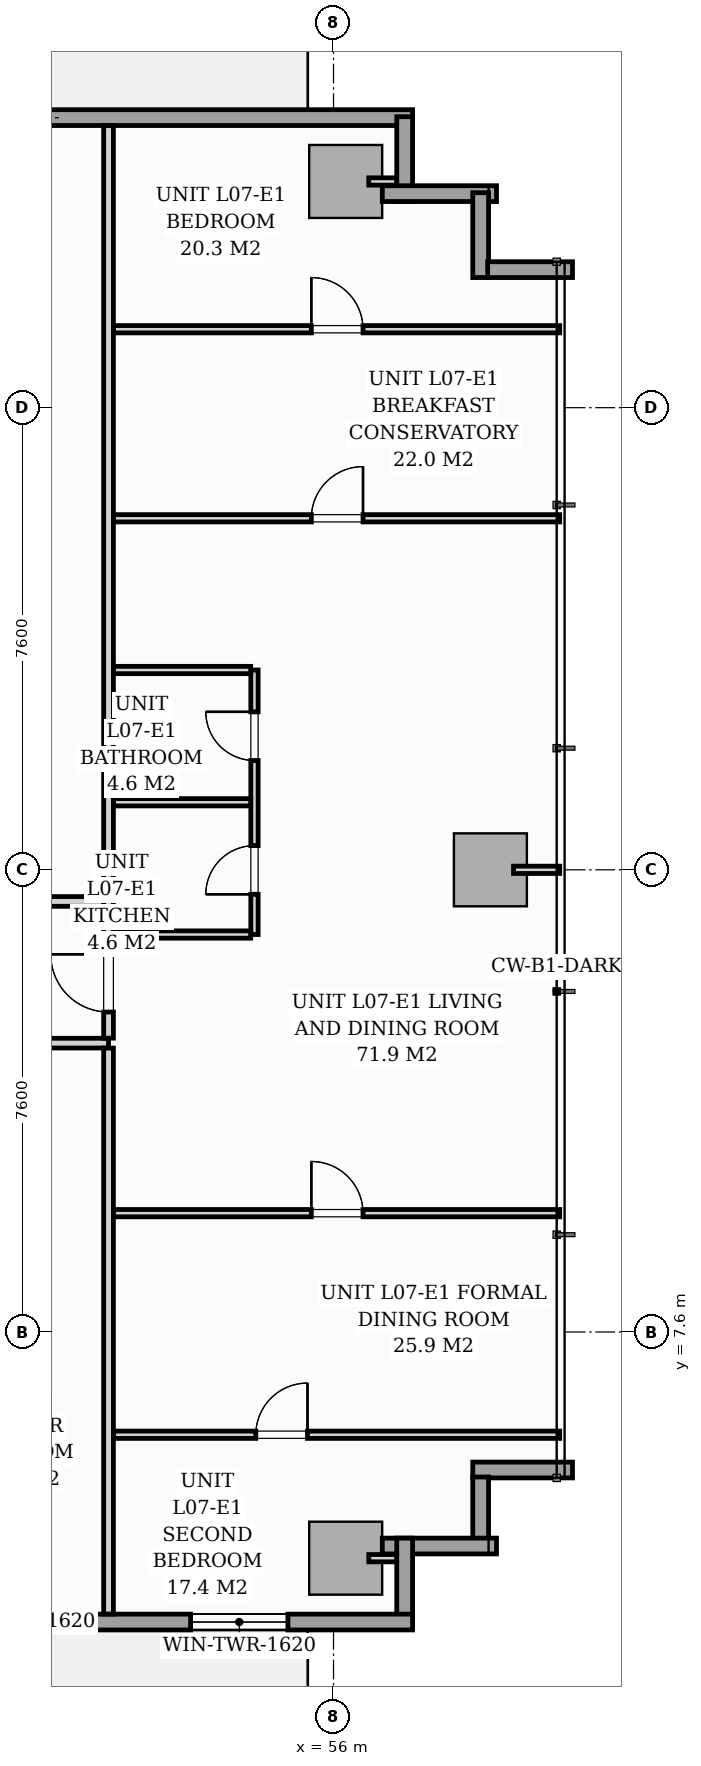
"""IFC4 building model, lengths in metres.
Left out: names, types, materials, properties, quantities, classifications, styles, units other than length and angle.
Written with IfcOpenShell. Run it as: python <this file> out.ifc"""

import sys

from ifc_helpers import new_model, si_unit, direction, frame, frame_2d, origin, origin_2d, place, context, subcontext, project, spatial, rectangle, extrude, source, transform, mapped, element, fill, save


model = new_model("IFC4")
c1 = context("Model", 3, precision=1e-05, world=origin(), true_north=direction((0.0, 1.0)))
c2 = subcontext(c1, "Body", "Model", "MODEL_VIEW")
j1 = project(units=[si_unit("LENGTHUNIT", "METRE"), si_unit("PLANEANGLEUNIT", "RADIAN")], contexts=[c1])
p1 = place(None, origin())
s1 = spatial("IfcSite", under=j1, at=p1, CompositionType="ELEMENT")
p2 = place(p1, origin())
s2 = spatial("IfcBuilding", under=s1, at=p2, CompositionType="ELEMENT")
p3 = place(p2, frame((0.0, 0.0, 29.4)))
s3 = spatial("IfcBuildingStorey", under=s2, at=p3, CompositionType="ELEMENT", Elevation=29.4)
m1 = source(origin(), c2, "Body", "SweptSolid", [
    extrude(rectangle(XDim=1.2, YDim=1.2, at=origin_2d()), origin(), (0.0, 0.0, 1.0), 3.196),
])
for number, where, z_axis, x_axis in (
    (1, (56.2, 3.88, 0.002), (0.0, 0.0, 1.0), (1.0, 0.0, 0.0)),
    (2, (56.2, 26.52, 0.002), (0.0, 0.0, 1.0), (1.0, 0.0, 0.0)),
    (3, (58.58, 15.2, 0.002), (0.0, 0.0, 1.0), (1.0, 0.0, 0.0)),
):
    element("IfcColumn", number, at=place(p3, frame(where, z_axis=z_axis, x_axis=x_axis)), inside=s3, PredefinedType="COLUMN", context=c2, shape_type="MappedRepresentation", body=[
        mapped(m1, transform((0.0, 0.0, 0.0), scale=1.0)),
    ])
p4 = place(p3, frame((40.15, 27.57, 0.0), z_axis=(0.0, 0.0, 1.0), x_axis=(1.0, 0.0, 0.0)))
e4 = element("IfcWall", 4, at=p4, inside=s3, PredefinedType="STANDARD", context=c2, shape_type="SweptSolid", body=[
    extrude(rectangle(XDim=17.15, YDim=0.26, at=frame_2d((8.575, 0.0))), origin(), (0.0, 0.0, 1.0), 2.94),
])
p5 = place(p4, frame((8.72, 0.0, 0.0)))
e5 = element("IfcOpeningElement", 5, at=p5, cuts=e4, PredefinedType="OPENING", context=c2, shape_type="SweptSolid", body=[
    extrude(rectangle(XDim=1.8, YDim=2.06, at=frame_2d((0.9, 1.03))), frame((0.0, 0.14, 0.0), z_axis=(0.0, -1.0, 0.0), x_axis=(1.0, 0.0, 0.0)), (0.0, 0.0, 1.0), 0.28),
])
p6 = place(p4, frame((0.7, 0.0, 0.65)))
e6 = element("IfcOpeningElement", 6, at=p6, cuts=e4, PredefinedType="OPENING", context=c2, shape_type="SweptSolid", body=[
    extrude(rectangle(XDim=1.6, YDim=1.5, at=frame_2d((0.8, 0.75))), frame((0.0, 0.14, 0.0), z_axis=(0.0, -1.0, 0.0), x_axis=(1.0, 0.0, 0.0)), (0.0, 0.0, 1.0), 0.28),
])
p7 = place(p3, frame((57.17, 27.585, 0.0), z_axis=(0.0, 0.0, 1.0), x_axis=(0.0, -1.0, 0.0)))
e7 = element("IfcWall", 7, at=p7, inside=s3, PredefinedType="STANDARD", context=c2, shape_type="SweptSolid", body=[
    extrude(rectangle(XDim=1.395, YDim=0.26, at=frame_2d((0.698, 0.0))), origin(), (0.0, 0.0, 1.0), 2.94),
])
p8 = place(p3, frame((56.802, 26.32, 0.0), z_axis=(0.0, 0.0, 1.0), x_axis=(1.0, 0.0, 0.0)))
e8 = element("IfcWall", 8, at=p8, inside=s3, PredefinedType="STANDARD", context=c2, shape_type="SweptSolid", body=[
    extrude(rectangle(XDim=1.878, YDim=0.26, at=frame_2d((0.939, 0.0))), origin(), (0.0, 0.0, 1.0), 2.94),
])
for number, where, z_axis, x_axis in (
    (9, (58.42, 26.335, 0.0), (0.0, 0.0, 1.0), (0.0, -1.0, 0.0)),
    (10, (58.535, 25.07, 0.0), (0.0, 0.0, 1.0), (1.0, 0.0, 0.0)),
):
    element("IfcWall", number, at=place(p3, frame(where, z_axis=z_axis, x_axis=x_axis)), inside=s3, PredefinedType="STANDARD", context=c2, shape_type="SweptSolid", body=[
        extrude(rectangle(XDim=1.395, YDim=0.26, at=frame_2d((0.698, 0.0))), origin(), (0.0, 0.0, 1.0), 2.94),
    ])
p9 = place(p3, frame((59.93, 5.33, 0.0), z_axis=(0.0, 0.0, 1.0), x_axis=(-1.0, 0.0, 0.0)))
e11 = element("IfcWall", 11, at=p9, inside=s3, PredefinedType="STANDARD", context=c2, shape_type="SweptSolid", body=[
    extrude(rectangle(XDim=1.64, YDim=0.26, at=frame_2d((0.82, 0.0))), origin(), (0.0, 0.0, 1.0), 2.94),
])
p10 = place(p3, frame((58.42, 5.215, 0.0), z_axis=(0.0, 0.0, 1.0), x_axis=(0.0, -1.0, 0.0)))
e12 = element("IfcWall", 12, at=p10, inside=s3, PredefinedType="STANDARD", context=c2, shape_type="SweptSolid", body=[
    extrude(rectangle(XDim=1.15, YDim=0.26, at=frame_2d((0.575, 0.0))), origin(), (0.0, 0.0, 1.0), 2.94),
])
p11 = place(p3, frame((58.68, 4.08, 0.0), z_axis=(0.0, 0.0, 1.0), x_axis=(-1.0, 0.0, 0.0)))
e13 = element("IfcWall", 13, at=p11, inside=s3, PredefinedType="STANDARD", context=c2, shape_type="SweptSolid", body=[
    extrude(rectangle(XDim=1.878, YDim=0.26, at=frame_2d((0.939, 0.0))), origin(), (0.0, 0.0, 1.0), 2.94),
])
p12 = place(p3, frame((57.17, 4.21, 0.0), z_axis=(0.0, 0.0, 1.0), x_axis=(0.0, -1.0, 0.0)))
e14 = element("IfcWall", 14, at=p12, inside=s3, PredefinedType="STANDARD", context=c2, shape_type="SweptSolid", body=[
    extrude(rectangle(XDim=1.395, YDim=0.26, at=frame_2d((0.698, 0.0))), origin(), (0.0, 0.0, 1.0), 2.94),
])
p13 = place(p3, frame((57.3, 2.83, 0.0), z_axis=(0.0, 0.0, 1.0), x_axis=(-1.0, 0.0, 0.0)))
e15 = element("IfcWall", 15, at=p13, inside=s3, PredefinedType="STANDARD", context=c2, shape_type="SweptSolid", body=[
    extrude(rectangle(XDim=17.15, YDim=0.26, at=frame_2d((8.575, 0.0))), origin(), (0.0, 0.0, 1.0), 2.94),
])
p14 = place(p13, frame((8.362, 0.0, 0.0)))
e16 = element("IfcOpeningElement", 16, at=p14, cuts=e15, PredefinedType="OPENING", context=c2, shape_type="SweptSolid", body=[
    extrude(rectangle(XDim=1.8, YDim=2.06, at=frame_2d((0.9, 1.03))), frame((0.0, 0.14, 0.0), z_axis=(0.0, -1.0, 0.0), x_axis=(1.0, 0.0, 0.0)), (0.0, 0.0, 1.0), 0.28),
])
p15 = place(p13, frame((2.05, 0.0, 0.65)))
e17 = element("IfcOpeningElement", 17, at=p15, cuts=e15, PredefinedType="OPENING", context=c2, shape_type="SweptSolid", body=[
    extrude(rectangle(XDim=1.6, YDim=1.5, at=frame_2d((0.8, 0.75))), frame((0.0, 0.14, 0.0), z_axis=(0.0, -1.0, 0.0), x_axis=(1.0, 0.0, 0.0)), (0.0, 0.0, 1.0), 0.28),
])
p16 = place(p13, frame((5.675, 0.0, 0.75)))
e18 = element("IfcOpeningElement", 18, at=p16, cuts=e15, PredefinedType="OPENING", context=c2, shape_type="SweptSolid", body=[
    extrude(rectangle(XDim=1.6, YDim=1.5, at=frame_2d((0.8, 0.75))), frame((0.0, 0.14, 0.0), z_axis=(0.0, -1.0, 0.0), x_axis=(1.0, 0.0, 0.0)), (0.0, 0.0, 1.0), 0.28),
])
p17 = place(p3, frame((15.2, 12.35, 0.0), z_axis=(0.0, 0.0, 1.0), x_axis=(1.0, 0.0, 0.0)))
e19 = element("IfcWall", 19, at=p17, inside=s3, PredefinedType="PARTITIONING", context=c2, shape_type="SweptSolid", body=[
    extrude(rectangle(XDim=37.1, YDim=0.16, at=frame_2d((18.55, 0.0))), origin(), (0.0, 0.0, 1.0), 2.94),
])
p18 = place(p17, frame((2.964, 0.0, 0.0)))
e20 = element("IfcOpeningElement", 20, at=p18, cuts=e19, PredefinedType="OPENING", context=c2, shape_type="SweptSolid", body=[
    extrude(rectangle(XDim=0.95, YDim=2.06, at=frame_2d((0.475, 1.03))), frame((0.0, 0.09, 0.0), z_axis=(0.0, -1.0, 0.0), x_axis=(1.0, 0.0, 0.0)), (0.0, 0.0, 1.0), 0.18),
])
p19 = place(p17, frame((28.202, 0.0, 0.0)))
e21 = element("IfcOpeningElement", 21, at=p19, cuts=e19, PredefinedType="OPENING", context=c2, shape_type="SweptSolid", body=[
    extrude(rectangle(XDim=0.95, YDim=2.06, at=frame_2d((0.475, 1.03))), frame((0.0, 0.09, 0.0), z_axis=(0.0, -1.0, 0.0), x_axis=(1.0, 0.0, 0.0)), (0.0, 0.0, 1.0), 0.18),
])
p20 = place(p3, frame((52.3, 2.962, 0.0), z_axis=(0.0, 0.0, 1.0), x_axis=(0.0, 1.0, 0.0)))
e22 = element("IfcWall", 22, at=p20, inside=s3, PredefinedType="PARTITIONING", context=c2, shape_type="SweptSolid", body=[
    extrude(rectangle(XDim=9.306, YDim=0.16, at=frame_2d((4.653, 0.0))), origin(), (0.0, 0.0, 1.0), 2.94),
])
p21 = place(p3, frame((52.3, 12.432, 0.0), z_axis=(0.0, 0.0, 1.0), x_axis=(0.0, 1.0, 0.0)))
e23 = element("IfcWall", 23, at=p21, inside=s3, PredefinedType="PARTITIONING", context=c2, shape_type="SweptSolid", body=[
    extrude(rectangle(XDim=15.006, YDim=0.16, at=frame_2d((7.503, 0.0))), origin(), (0.0, 0.0, 1.0), 2.94),
])
p22 = place(p21, frame((0.429, 0.0, 0.0)))
e24 = element("IfcOpeningElement", 24, at=p22, cuts=e23, PredefinedType="OPENING", context=c2, shape_type="SweptSolid", body=[
    extrude(rectangle(XDim=0.95, YDim=2.06, at=frame_2d((0.475, 1.03))), frame((0.0, 0.09, 0.0), z_axis=(0.0, -1.0, 0.0), x_axis=(1.0, 0.0, 0.0)), (0.0, 0.0, 1.0), 0.18),
])
p23 = place(p3, frame((54.7, 14.136, 0.0), z_axis=(0.0, 0.0, 1.0), x_axis=(0.0, 1.0, 0.0)))
e25 = element("IfcWall", 25, at=p23, inside=s3, PredefinedType="PARTITIONING", context=c2, shape_type="SweptSolid", body=[
    extrude(rectangle(XDim=4.35, YDim=0.12, at=frame_2d((2.175, 0.0))), origin(), (0.0, 0.0, 1.0), 2.94),
])
p24 = place(p23, frame((0.662, 0.0, 0.0)))
e26 = element("IfcOpeningElement", 26, at=p24, cuts=e25, PredefinedType="OPENING", context=c2, shape_type="SweptSolid", body=[
    extrude(rectangle(XDim=0.8, YDim=2.0, at=frame_2d((0.4, 1.0))), frame((0.0, 0.07, 0.0), z_axis=(0.0, -1.0, 0.0), x_axis=(1.0, 0.0, 0.0)), (0.0, 0.0, 1.0), 0.14),
])
p25 = place(p23, frame((2.862, 0.0, 0.0)))
e27 = element("IfcOpeningElement", 27, at=p25, cuts=e25, PredefinedType="OPENING", context=c2, shape_type="SweptSolid", body=[
    extrude(rectangle(XDim=0.8, YDim=2.02, at=frame_2d((0.4, 1.01))), frame((0.0, 0.07, 0.0), z_axis=(0.0, -1.0, 0.0), x_axis=(1.0, 0.0, 0.0)), (0.0, 0.0, 1.0), 0.14),
])
p26 = place(p3, frame((52.382, 16.311, 0.0), z_axis=(0.0, 0.0, 1.0), x_axis=(1.0, 0.0, 0.0)))
e28 = element("IfcWall", 28, at=p26, inside=s3, PredefinedType="PARTITIONING", context=c2, shape_type="SweptSolid", body=[
    extrude(rectangle(XDim=2.256, YDim=0.12, at=frame_2d((1.128, 0.0))), origin(), (0.0, 0.0, 1.0), 2.045),
])
for number, where, z_axis, x_axis in (
    (29, (52.382, 14.136, 0.0), (0.0, 0.0, 1.0), (1.0, 0.0, 0.0)),
    (30, (52.382, 18.486, 0.0), (0.0, 0.0, 1.0), (1.0, 0.0, 0.0)),
):
    element("IfcWall", number, at=place(p3, frame(where, z_axis=z_axis, x_axis=x_axis)), inside=s3, PredefinedType="PARTITIONING", context=c2, shape_type="SweptSolid", body=[
        extrude(rectangle(XDim=2.256, YDim=0.12, at=frame_2d((1.128, 0.0))), origin(), (0.0, 0.0, 1.0), 2.94),
    ])
p27 = place(p3, frame((52.382, 24.09, 0.0), z_axis=(0.0, 0.0, 1.0), x_axis=(1.0, 0.0, 0.0)))
e31 = element("IfcWall", 31, at=p27, inside=s3, PredefinedType="PARTITIONING", context=c2, shape_type="SweptSolid", body=[
    extrude(rectangle(XDim=7.338, YDim=0.12, at=frame_2d((3.669, 0.0))), origin(), (0.0, 0.0, 1.0), 2.94),
])
p28 = place(p27, frame((3.253, 0.0, 0.0)))
e32 = element("IfcOpeningElement", 32, at=p28, cuts=e31, PredefinedType="OPENING", context=c2, shape_type="SweptSolid", body=[
    extrude(rectangle(XDim=0.85, YDim=2.05, at=frame_2d((0.425, 1.025))), frame((0.0, 0.07, 0.0), z_axis=(0.0, -1.0, 0.0), x_axis=(1.0, 0.0, 0.0)), (0.0, 0.0, 1.0), 0.14),
])
p29 = place(p3, frame((52.382, 5.91, 0.0), z_axis=(0.0, 0.0, 1.0), x_axis=(1.0, 0.0, 0.0)))
e33 = element("IfcWall", 33, at=p29, inside=s3, PredefinedType="PARTITIONING", context=c2, shape_type="SweptSolid", body=[
    extrude(rectangle(XDim=7.338, YDim=0.12, at=frame_2d((3.669, 0.0))), origin(), (0.0, 0.0, 1.0), 2.94),
])
p30 = place(p29, frame((2.34, 0.0, 0.0)))
e34 = element("IfcOpeningElement", 34, at=p30, cuts=e33, PredefinedType="OPENING", context=c2, shape_type="SweptSolid", body=[
    extrude(rectangle(XDim=0.85, YDim=2.05, at=frame_2d((0.425, 1.025))), frame((0.0, 0.07, 0.0), z_axis=(0.0, -1.0, 0.0), x_axis=(1.0, 0.0, 0.0)), (0.0, 0.0, 1.0), 0.14),
])
p31 = place(p3, frame((52.382, 9.554, 0.0), z_axis=(0.0, 0.0, 1.0), x_axis=(1.0, 0.0, 0.0)))
e35 = element("IfcWall", 35, at=p31, inside=s3, PredefinedType="PARTITIONING", context=c2, shape_type="SweptSolid", body=[
    extrude(rectangle(XDim=7.338, YDim=0.12, at=frame_2d((3.669, 0.0))), origin(), (0.0, 0.0, 1.0), 2.94),
])
p32 = place(p31, frame((3.253, 0.0, 0.0)))
e36 = element("IfcOpeningElement", 36, at=p32, cuts=e35, PredefinedType="OPENING", context=c2, shape_type="SweptSolid", body=[
    extrude(rectangle(XDim=0.85, YDim=2.05, at=frame_2d((0.425, 1.025))), frame((0.0, 0.07, 0.0), z_axis=(0.0, -1.0, 0.0), x_axis=(1.0, 0.0, 0.0)), (0.0, 0.0, 1.0), 0.14),
])
p33 = place(p3, frame((52.382, 20.981, 0.0), z_axis=(0.0, 0.0, 1.0), x_axis=(1.0, 0.0, 0.0)))
e37 = element("IfcWall", 37, at=p33, inside=s3, PredefinedType="PARTITIONING", context=c2, shape_type="SweptSolid", body=[
    extrude(rectangle(XDim=7.338, YDim=0.12, at=frame_2d((3.669, 0.0))), origin(), (0.0, 0.0, 1.0), 2.94),
])
p34 = place(p33, frame((3.253, 0.0, 0.0)))
e38 = element("IfcOpeningElement", 38, at=p34, cuts=e37, PredefinedType="OPENING", context=c2, shape_type="SweptSolid", body=[
    extrude(rectangle(XDim=0.85, YDim=2.05, at=frame_2d((0.425, 1.025))), frame((0.0, 0.07, 0.0), z_axis=(0.0, -1.0, 0.0), x_axis=(1.0, 0.0, 0.0)), (0.0, 0.0, 1.0), 0.14),
])
p35 = place(p3, frame((45.84, 14.68, 0.0), z_axis=(0.0, 0.0, 1.0), x_axis=(1.0, 0.0, 0.0)))
e39 = element("IfcWall", 39, at=p35, inside=s3, PredefinedType="PARTITIONING", context=c2, shape_type="SweptSolid", body=[
    extrude(rectangle(XDim=6.378, YDim=0.16, at=frame_2d((3.189, 0.0))), origin(), (0.0, 0.0, 1.0), 2.94),
])
p36 = place(p35, frame((2.815, 0.0, 0.0)))
e40 = element("IfcOpeningElement", 40, at=p36, cuts=e39, PredefinedType="OPENING", context=c2, shape_type="SweptSolid", body=[
    extrude(rectangle(XDim=0.95, YDim=2.06, at=frame_2d((0.475, 1.03))), frame((0.0, 0.09, 0.0), z_axis=(0.0, -1.0, 0.0), x_axis=(1.0, 0.0, 0.0)), (0.0, 0.0, 1.0), 0.18),
])
for number, where, z_axis, x_axis in (
    (41, (56.58, 3.88, 0.0), (0.0, 0.0, 1.0), (1.0, 0.0, 0.0)),
    (42, (56.58, 26.52, 0.0), (0.0, 0.0, 1.0), (1.0, 0.0, 0.0)),
):
    element("IfcWall", number, at=place(p3, frame(where, z_axis=z_axis, x_axis=x_axis)), inside=s3, PredefinedType="PARTITIONING", context=c2, shape_type="SweptSolid", body=[
        extrude(rectangle(XDim=0.458, YDim=0.12, at=frame_2d((0.229, 0.0))), origin(), (0.0, 0.0, 1.0), 2.94),
    ])
p37 = place(p3, frame((58.96, 15.2, 0.0), z_axis=(0.0, 0.0, 1.0), x_axis=(1.0, 0.0, 0.0)))
e43 = element("IfcWall", 43, at=p37, inside=s3, PredefinedType="PARTITIONING", context=c2, shape_type="SweptSolid", body=[
    extrude(rectangle(XDim=0.76, YDim=0.12, at=frame_2d((0.38, 0.0))), origin(), (0.0, 0.0, 1.0), 2.94),
])
m2 = source(origin(), c2, "Body", "SweptSolid", [
    extrude(rectangle(XDim=1.6, YDim=1.5, at=frame_2d((0.8, 0.75))), frame((0.0, 0.03, 0.0), z_axis=(0.0, -1.0, 0.0), x_axis=(1.0, 0.0, 0.0)), (0.0, 0.0, 1.0), 0.06),
])
p38 = place(p15, origin())
e44 = element("IfcWindow", 44, at=p38, inside=s3, PartitioningType="SINGLE_PANEL", PredefinedType="WINDOW", context=c2, shape_type="MappedRepresentation", body=[
    mapped(m2, transform((0.0, 0.0, 0.0), scale=1.0)),
])
fill(e17, e44)
p39 = place(p16, origin())
e45 = element("IfcWindow", 45, at=p39, inside=s3, PartitioningType="SINGLE_PANEL", PredefinedType="WINDOW", context=c2, shape_type="MappedRepresentation", body=[
    mapped(m2, transform((0.0, 0.0, 0.0), scale=1.0)),
])
fill(e18, e45)
m3 = source(origin(), c2, "Body", "SweptSolid", [
    extrude(rectangle(XDim=0.95, YDim=2.06, at=frame_2d((0.475, 1.03))), frame((0.0, 0.025, 0.0), z_axis=(0.0, -1.0, 0.0), x_axis=(1.0, 0.0, 0.0)), (0.0, 0.0, 1.0), 0.05),
])
p40 = place(p22, origin())
e46 = element("IfcDoor", 46, at=p40, inside=s3, OperationType="SINGLE_SWING_RIGHT", PredefinedType="DOOR", context=c2, shape_type="MappedRepresentation", body=[
    mapped(m3, transform((0.0, 0.0, 0.0), scale=1.0)),
])
fill(e24, e46)
m4 = source(origin(), c2, "Body", "SweptSolid", [
    extrude(rectangle(XDim=0.8, YDim=2.0, at=frame_2d((0.4, 1.0))), frame((0.0, 0.025, 0.0), z_axis=(0.0, -1.0, 0.0), x_axis=(1.0, 0.0, 0.0)), (0.0, 0.0, 1.0), 0.05),
])
p41 = place(p24, origin())
e47 = element("IfcDoor", 47, at=p41, inside=s3, OperationType="SINGLE_SWING_LEFT", PredefinedType="DOOR", context=c2, shape_type="MappedRepresentation", body=[
    mapped(m4, transform((0.0, 0.0, 0.0), scale=1.0)),
])
fill(e26, e47)
m5 = source(origin(), c2, "Body", "SweptSolid", [
    extrude(rectangle(XDim=0.8, YDim=2.02, at=frame_2d((0.4, 1.01))), frame((0.0, 0.025, 0.0), z_axis=(0.0, -1.0, 0.0), x_axis=(1.0, 0.0, 0.0)), (0.0, 0.0, 1.0), 0.05),
])
p42 = place(p25, origin())
e48 = element("IfcDoor", 48, at=p42, inside=s3, OperationType="SINGLE_SWING_RIGHT", PredefinedType="DOOR", context=c2, shape_type="MappedRepresentation", body=[
    mapped(m5, transform((0.0, 0.0, 0.0), scale=1.0)),
])
fill(e27, e48)
m6 = source(origin(), c2, "Body", "SweptSolid", [
    extrude(rectangle(XDim=0.85, YDim=2.05, at=frame_2d((0.425, 1.025))), frame((0.0, 0.025, 0.0), z_axis=(0.0, -1.0, 0.0), x_axis=(1.0, 0.0, 0.0)), (0.0, 0.0, 1.0), 0.05),
])
p43 = place(p28, origin())
e49 = element("IfcDoor", 49, at=p43, inside=s3, OperationType="SINGLE_SWING_LEFT", PredefinedType="DOOR", context=c2, shape_type="MappedRepresentation", body=[
    mapped(m6, transform((0.0, 0.0, 0.0), scale=1.0)),
])
fill(e32, e49)
p44 = place(p30, origin())
e50 = element("IfcDoor", 50, at=p44, inside=s3, OperationType="SINGLE_SWING_RIGHT", PredefinedType="DOOR", context=c2, shape_type="MappedRepresentation", body=[
    mapped(m6, transform((0.0, 0.0, 0.0), scale=1.0)),
])
fill(e34, e50)
p45 = place(p32, origin())
e51 = element("IfcDoor", 51, at=p45, inside=s3, OperationType="SINGLE_SWING_LEFT", PredefinedType="DOOR", context=c2, shape_type="MappedRepresentation", body=[
    mapped(m6, transform((0.0, 0.0, 0.0), scale=1.0)),
])
fill(e36, e51)
p46 = place(p34, origin())
e52 = element("IfcDoor", 52, at=p46, inside=s3, OperationType="SINGLE_SWING_RIGHT", PredefinedType="DOOR", context=c2, shape_type="MappedRepresentation", body=[
    mapped(m6, transform((0.0, 0.0, 0.0), scale=1.0)),
])
fill(e38, e52)
save(model, sys.argv[1])
